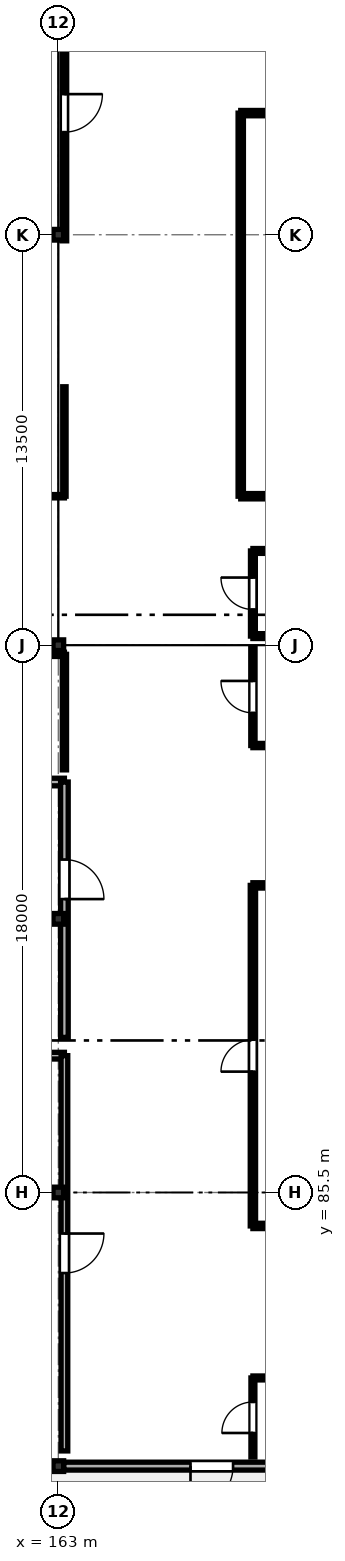
"""IFC4 building model, lengths in metres.
Left out: names, types, materials, properties, quantities, classifications, styles, units other than length and angle.
Written with IfcOpenShell. Run it as: python <this file> out.ifc"""

import sys

from ifc_helpers import new_model, si_unit, direction, frame, frame_2d, origin, origin_2d, place, context, subcontext, project, spatial, rectangle, i_section, extrude, element, fill, save


model = new_model("IFC4")
c1 = context("Model", 3, precision=1e-05, world=origin(), true_north=direction((0.0, 1.0)))
c2 = subcontext(c1, "Body", "Model", "MODEL_VIEW")
j1 = project(units=[si_unit("LENGTHUNIT", "METRE"), si_unit("PLANEANGLEUNIT", "RADIAN")], contexts=[c1])
p1 = place(None, origin())
s1 = spatial("IfcSite", under=j1, at=p1, CompositionType="ELEMENT")
p2 = place(p1, origin())
s2 = spatial("IfcBuilding", under=s1, at=p2, CompositionType="ELEMENT")
p3 = place(p2, frame((0.0, 0.0, 17.6)))
s3 = spatial("IfcBuildingStorey", under=s2, at=p3, CompositionType="ELEMENT", Elevation=17.6)
for number, where, z_axis, x_axis in (
    (1, (163.0, 76.5, 0.0), (0.0, 0.0, 1.0), (1.0, 0.0, 0.0)),
    (2, (163.0, 85.5, 0.0), (0.0, 0.0, 1.0), (1.0, 0.0, 0.0)),
    (3, (163.0, 94.5, 0.0), (0.0, 0.0, 1.0), (1.0, 0.0, 0.0)),
    (4, (163.0, 103.5, 0.0), (0.0, 0.0, 1.0), (1.0, 0.0, 0.0)),
    (5, (163.0, 117.0, 0.0), (0.0, 0.0, 1.0), (1.0, 0.0, 0.0)),
):
    element("IfcColumn", number, at=place(p3, frame(where, z_axis=z_axis, x_axis=x_axis)), inside=s3, PredefinedType="COLUMN", context=c2, shape_type="SweptSolid", body=[
        extrude(i_section(OverallWidth=0.35, OverallDepth=0.35, WebThickness=0.012, FlangeThickness=0.019, FilletRadius=0.02, at=origin_2d()), origin(), (0.0, 0.0, 1.0), 3.2),
    ])
p4 = place(p3, frame((171.825, 76.5, 0.0), z_axis=(0.0, 0.0, 1.0), x_axis=(-1.0, 0.0, 0.0)))
e6 = element("IfcWall", 6, at=p4, inside=s3, PredefinedType="SOLIDWALL", context=c2, shape_type="SweptSolid", body=[
    extrude(rectangle(XDim=8.65, YDim=0.26, at=frame_2d((4.325, 0.0))), origin(), (0.0, 0.0, 1.0), 2.505),
])
p5 = place(p4, frame((3.078, 0.0, 0.0)))
e7 = element("IfcOpeningElement", 7, at=p5, cuts=e6, PredefinedType="OPENING", context=c2, shape_type="SweptSolid", body=[
    extrude(rectangle(XDim=1.4, YDim=2.25, at=frame_2d((0.7, 1.125))), frame((0.0, 0.14, 0.0), z_axis=(0.0, -1.0, 0.0), x_axis=(1.0, 0.0, 0.0)), (0.0, 0.0, 1.0), 0.28),
])
p6 = place(p3, frame((162.825, 76.5, 0.0), z_axis=(0.0, 0.0, 1.0), x_axis=(-1.0, 0.0, 0.0)))
e8 = element("IfcWall", 8, at=p6, inside=s3, PredefinedType="SOLIDWALL", context=c2, shape_type="SweptSolid", body=[
    extrude(rectangle(XDim=8.65, YDim=0.26, at=frame_2d((4.325, 0.0))), origin(), (0.0, 0.0, 1.0), 2.505),
])
p7 = place(p6, frame((3.625, 0.0, 0.75)))
e9 = element("IfcOpeningElement", 9, at=p7, cuts=e8, PredefinedType="OPENING", context=c2, shape_type="SweptSolid", body=[
    extrude(rectangle(XDim=1.4, YDim=1.55, at=frame_2d((0.7, 0.775))), frame((0.0, 0.14, 0.0), z_axis=(0.0, -1.0, 0.0), x_axis=(1.0, 0.0, 0.0)), (0.0, 0.0, 1.0), 0.28),
])
p8 = place(p3, frame((154.6, 90.0, 0.0), z_axis=(0.0, 0.0, 1.0), x_axis=(1.0, 0.0, 0.0)))
e10 = element("IfcWall", 10, at=p8, inside=s3, PredefinedType="SOLIDWALL", context=c2, shape_type="SweptSolid", body=[
    extrude(rectangle(XDim=8.6, YDim=0.22, at=frame_2d((4.3, 0.0))), origin(), (0.0, 0.0, 1.0), 2.555),
])
p9 = place(p3, frame((163.2, 90.0, 0.0), z_axis=(0.0, 0.0, 1.0), x_axis=(0.0, -1.0, 0.0)))
e11 = element("IfcWall", 11, at=p9, inside=s3, PredefinedType="SOLIDWALL", context=c2, shape_type="SweptSolid", body=[
    extrude(rectangle(XDim=13.0, YDim=0.22, at=frame_2d((6.5, 0.0))), origin(), (0.0, 0.0, 1.0), 2.505),
])
p10 = place(p9, frame((5.85, 0.0, 0.0)))
e12 = element("IfcOpeningElement", 12, at=p10, cuts=e11, PredefinedType="OPENING", context=c2, shape_type="SweptSolid", body=[
    extrude(rectangle(XDim=1.3, YDim=2.1, at=frame_2d((0.65, 1.05))), frame((0.0, 0.12, 0.0), z_axis=(0.0, -1.0, 0.0), x_axis=(1.0, 0.0, 0.0)), (0.0, 0.0, 1.0), 0.24),
])
p11 = place(p3, frame((154.6, 99.0, 0.0), z_axis=(0.0, 0.0, 1.0), x_axis=(1.0, 0.0, 0.0)))
e13 = element("IfcWall", 13, at=p11, inside=s3, PredefinedType="SOLIDWALL", context=c2, shape_type="SweptSolid", body=[
    extrude(rectangle(XDim=8.6, YDim=0.25, at=frame_2d((4.3, 0.0))), origin(), (0.0, 0.0, 1.0), 2.555),
])
p12 = place(p3, frame((163.2, 99.0, 0.0), z_axis=(0.0, 0.0, 1.0), x_axis=(0.0, -1.0, 0.0)))
e14 = element("IfcWall", 14, at=p12, inside=s3, PredefinedType="SOLIDWALL", context=c2, shape_type="SweptSolid", body=[
    extrude(rectangle(XDim=8.4, YDim=0.25, at=frame_2d((4.2, 0.0))), origin(), (0.0, 0.0, 1.0), 2.505),
])
p13 = place(p12, frame((2.55, 0.0, 0.0)))
e15 = element("IfcOpeningElement", 15, at=p13, cuts=e14, PredefinedType="OPENING", context=c2, shape_type="SweptSolid", body=[
    extrude(rectangle(XDim=1.3, YDim=2.1, at=frame_2d((0.65, 1.05))), frame((0.0, 0.135, 0.0), z_axis=(0.0, -1.0, 0.0), x_axis=(1.0, 0.0, 0.0)), (0.0, 0.0, 1.0), 0.27),
])
p14 = place(p3, frame((163.2, 125.2, 0.0), z_axis=(0.0, 0.0, 1.0), x_axis=(0.0, -1.0, 0.0)))
e16 = element("IfcWall", 16, at=p14, inside=s3, PredefinedType="PARTITIONING", context=c2, shape_type="SweptSolid", body=[
    extrude(rectangle(XDim=8.4, YDim=0.15, at=frame_2d((4.2, 0.0))), origin(), (0.0, 0.0, 1.0), 2.355),
])
p15 = place(p14, frame((3.575, 0.0, 0.0)))
e17 = element("IfcOpeningElement", 17, at=p15, cuts=e16, PredefinedType="OPENING", context=c2, shape_type="SweptSolid", body=[
    extrude(rectangle(XDim=1.25, YDim=2.1, at=frame_2d((0.625, 1.05))), frame((0.0, 0.085, 0.0), z_axis=(0.0, -1.0, 0.0), x_axis=(1.0, 0.0, 0.0)), (0.0, 0.0, 1.0), 0.17),
])
p16 = place(p3, frame((180.8, 100.2, 0.0), z_axis=(0.0, 0.0, 1.0), x_axis=(-1.0, 0.0, 0.0)))
e18 = element("IfcWall", 18, at=p16, inside=s3, PredefinedType="PARTITIONING", context=c2, shape_type="SweptSolid", body=[
    extrude(rectangle(XDim=11.4, YDim=0.14, at=frame_2d((5.7, 0.0))), origin(), (0.0, 0.0, 1.0), 2.565),
])
p17 = place(p3, frame((169.4, 100.2, 0.0), z_axis=(0.0, 0.0, 1.0), x_axis=(0.0, 1.0, 0.0)))
e19 = element("IfcWall", 19, at=p17, inside=s3, PredefinedType="PARTITIONING", context=c2, shape_type="SweptSolid", body=[
    extrude(rectangle(XDim=3.2, YDim=0.14, at=frame_2d((1.6, 0.0))), origin(), (0.0, 0.0, 1.0), 2.515),
])
p18 = place(p17, frame((1.075, 0.0, 0.0)))
e20 = element("IfcOpeningElement", 20, at=p18, cuts=e19, PredefinedType="OPENING", context=c2, shape_type="SweptSolid", body=[
    extrude(rectangle(XDim=1.05, YDim=2.1, at=frame_2d((0.525, 1.05))), frame((0.0, 0.08, 0.0), z_axis=(0.0, -1.0, 0.0), x_axis=(1.0, 0.0, 0.0)), (0.0, 0.0, 1.0), 0.16),
])
p19 = place(p3, frame((163.2, 108.4, 0.0), z_axis=(0.0, 0.0, 1.0), x_axis=(-1.0, 0.0, 0.0)))
e21 = element("IfcWall", 21, at=p19, inside=s3, PredefinedType="PARTITIONING", context=c2, shape_type="SweptSolid", body=[
    extrude(rectangle(XDim=16.6, YDim=0.11, at=frame_2d((8.3, 0.0))), origin(), (0.0, 0.0, 1.0), 2.355),
])
p20 = place(p19, frame((7.725, 0.0, 0.0)))
e22 = element("IfcOpeningElement", 22, at=p20, cuts=e21, PredefinedType="OPENING", context=c2, shape_type="SweptSolid", body=[
    extrude(rectangle(XDim=1.15, YDim=2.1, at=frame_2d((0.575, 1.05))), frame((0.0, 0.065, 0.0), z_axis=(0.0, -1.0, 0.0), x_axis=(1.0, 0.0, 0.0)), (0.0, 0.0, 1.0), 0.13),
])
p21 = place(p3, frame((163.2, 112.0, 0.0), z_axis=(0.0, 0.0, 1.0), x_axis=(0.0, -1.0, 0.0)))
e23 = element("IfcWall", 23, at=p21, inside=s3, PredefinedType="PARTITIONING", context=c2, shape_type="SweptSolid", body=[
    extrude(rectangle(XDim=3.6, YDim=0.11, at=frame_2d((1.8, 0.0))), origin(), (0.0, 0.0, 1.0), 2.355),
])
for number, where, z_axis, x_axis in (
    (24, (173.4, 84.4, 0.0), (0.0, 0.0, 1.0), (-1.0, 0.0, 0.0)),
    (25, (169.4, 95.6, 0.0), (0.0, 0.0, 1.0), (1.0, 0.0, 0.0)),
):
    element("IfcWall", number, at=place(p3, frame(where, z_axis=z_axis, x_axis=x_axis)), inside=s3, PredefinedType="PARTITIONING", context=c2, shape_type="SweptSolid", body=[
        extrude(rectangle(XDim=4.0, YDim=0.175, at=frame_2d((2.0, 0.0))), origin(), (0.0, 0.0, 1.0), 2.565),
    ])
p22 = place(p3, frame((169.4, 84.4, 0.0), z_axis=(0.0, 0.0, 1.0), x_axis=(0.0, 1.0, 0.0)))
e26 = element("IfcWall", 26, at=p22, inside=s3, PredefinedType="PARTITIONING", context=c2, shape_type="SweptSolid", body=[
    extrude(rectangle(XDim=11.2, YDim=0.175, at=frame_2d((5.6, 0.0))), origin(), (0.0, 0.0, 1.0), 2.515),
])
p23 = place(p22, frame((5.075, 0.0, 0.0)))
e27 = element("IfcOpeningElement", 27, at=p23, cuts=e26, PredefinedType="OPENING", context=c2, shape_type="SweptSolid", body=[
    extrude(rectangle(XDim=1.05, YDim=2.1, at=frame_2d((0.525, 1.05))), frame((0.0, 0.097, 0.0), z_axis=(0.0, -1.0, 0.0), x_axis=(1.0, 0.0, 0.0)), (0.0, 0.0, 1.0), 0.195),
])
for number, where, z_axis, x_axis in (
    (28, (173.4, 103.8, 0.0), (0.0, 0.0, 1.0), (-1.0, 0.0, 0.0)),
    (29, (169.4, 106.6, 0.0), (0.0, 0.0, 1.0), (1.0, 0.0, 0.0)),
):
    element("IfcWall", number, at=place(p3, frame(where, z_axis=z_axis, x_axis=x_axis)), inside=s3, PredefinedType="PARTITIONING", context=c2, shape_type="SweptSolid", body=[
        extrude(rectangle(XDim=4.0, YDim=0.16, at=frame_2d((2.0, 0.0))), origin(), (0.0, 0.0, 1.0), 2.355),
    ])
p24 = place(p3, frame((169.4, 103.8, 0.0), z_axis=(0.0, 0.0, 1.0), x_axis=(0.0, 1.0, 0.0)))
e30 = element("IfcWall", 30, at=p24, inside=s3, PredefinedType="PARTITIONING", context=c2, shape_type="SweptSolid", body=[
    extrude(rectangle(XDim=2.8, YDim=0.16, at=frame_2d((1.4, 0.0))), origin(), (0.0, 0.0, 1.0), 2.515),
])
p25 = place(p24, frame((0.875, 0.0, 0.0)))
e31 = element("IfcOpeningElement", 31, at=p25, cuts=e30, PredefinedType="OPENING", context=c2, shape_type="SweptSolid", body=[
    extrude(rectangle(XDim=1.05, YDim=2.1, at=frame_2d((0.525, 1.05))), frame((0.0, 0.09, 0.0), z_axis=(0.0, -1.0, 0.0), x_axis=(1.0, 0.0, 0.0)), (0.0, 0.0, 1.0), 0.18),
])
p26 = place(p3, frame((159.2, 103.2, 0.0), z_axis=(0.0, 0.0, 1.0), x_axis=(1.0, 0.0, 0.0)))
e32 = element("IfcWall", 32, at=p26, inside=s3, PredefinedType="PARTITIONING", context=c2, shape_type="SweptSolid", body=[
    extrude(rectangle(XDim=4.0, YDim=0.14, at=frame_2d((2.0, 0.0))), origin(), (0.0, 0.0, 1.0), 2.355),
])
p27 = place(p26, frame((1.55, 0.0, 0.0)))
e33 = element("IfcOpeningElement", 33, at=p27, cuts=e32, PredefinedType="OPENING", context=c2, shape_type="SweptSolid", body=[
    extrude(rectangle(XDim=0.9, YDim=2.1, at=frame_2d((0.45, 1.05))), frame((0.0, 0.08, 0.0), z_axis=(0.0, -1.0, 0.0), x_axis=(1.0, 0.0, 0.0)), (0.0, 0.0, 1.0), 0.16),
])
p28 = place(p3, frame((163.2, 103.2, 0.0), z_axis=(0.0, 0.0, 1.0), x_axis=(0.0, -1.0, 0.0)))
e34 = element("IfcWall", 34, at=p28, inside=s3, PredefinedType="PARTITIONING", context=c2, shape_type="SweptSolid", body=[
    extrude(rectangle(XDim=3.8, YDim=0.14, at=frame_2d((1.9, 0.0))), origin(), (0.0, 0.0, 1.0), 2.355),
])
p29 = place(p3, frame((169.4, 79.4, 0.0), z_axis=(0.0, 0.0, 1.0), x_axis=(1.0, 0.0, 0.0)))
e35 = element("IfcWall", 35, at=p29, inside=s3, PredefinedType="PARTITIONING", context=c2, shape_type="SweptSolid", body=[
    extrude(rectangle(XDim=4.0, YDim=0.13, at=frame_2d((2.0, 0.0))), origin(), (0.0, 0.0, 1.0), 2.565),
])
p30 = place(p3, frame((169.4, 76.8, 0.0), z_axis=(0.0, 0.0, 1.0), x_axis=(0.0, 1.0, 0.0)))
e36 = element("IfcWall", 36, at=p30, inside=s3, PredefinedType="PARTITIONING", context=c2, shape_type="SweptSolid", body=[
    extrude(rectangle(XDim=2.6, YDim=0.13, at=frame_2d((1.3, 0.0))), origin(), (0.0, 0.0, 1.0), 2.515),
])
p31 = place(p30, frame((0.79, 0.0, 0.0)))
e37 = element("IfcOpeningElement", 37, at=p31, cuts=e36, PredefinedType="OPENING", context=c2, shape_type="SweptSolid", body=[
    extrude(rectangle(XDim=1.02, YDim=2.05, at=frame_2d((0.51, 1.025))), frame((0.0, 0.075, 0.0), z_axis=(0.0, -1.0, 0.0), x_axis=(1.0, 0.0, 0.0)), (0.0, 0.0, 1.0), 0.15),
])
p32 = place(p3, frame((173.4, 108.4, 0.0), z_axis=(0.0, 0.0, 1.0), x_axis=(-1.0, 0.0, 0.0)))
e38 = element("IfcWall", 38, at=p32, inside=s3, PredefinedType="PARTITIONING", context=c2, shape_type="SweptSolid", body=[
    extrude(rectangle(XDim=4.4, YDim=0.175, at=frame_2d((2.2, 0.0))), origin(), (0.0, 0.0, 1.0), 2.355),
])
p33 = place(p3, frame((169.0, 121.0, 0.0), z_axis=(0.0, 0.0, 1.0), x_axis=(1.0, 0.0, 0.0)))
e39 = element("IfcWall", 39, at=p33, inside=s3, PredefinedType="PARTITIONING", context=c2, shape_type="SweptSolid", body=[
    extrude(rectangle(XDim=4.4, YDim=0.175, at=frame_2d((2.2, 0.0))), origin(), (0.0, 0.0, 1.0), 2.565),
])
p34 = place(p33, frame((1.625, 0.0, 0.0)))
e40 = element("IfcOpeningElement", 40, at=p34, cuts=e39, PredefinedType="OPENING", context=c2, shape_type="SweptSolid", body=[
    extrude(rectangle(XDim=1.15, YDim=2.1, at=frame_2d((0.575, 1.05))), frame((0.0, 0.097, 0.0), z_axis=(0.0, -1.0, 0.0), x_axis=(1.0, 0.0, 0.0)), (0.0, 0.0, 1.0), 0.195),
])
p35 = place(p3, frame((169.0, 108.4, 0.0), z_axis=(0.0, 0.0, 1.0), x_axis=(0.0, 1.0, 0.0)))
e41 = element("IfcWall", 41, at=p35, inside=s3, PredefinedType="PARTITIONING", context=c2, shape_type="SweptSolid", body=[
    extrude(rectangle(XDim=12.6, YDim=0.175, at=frame_2d((6.3, 0.0))), origin(), (0.0, 0.0, 1.0), 2.515),
])
p36 = place(p5, origin())
e42 = element("IfcDoor", 42, at=p36, inside=s3, OperationType="SINGLE_SWING_RIGHT", PredefinedType="DOOR", context=c2, shape_type="SweptSolid", body=[
    extrude(rectangle(XDim=1.4, YDim=2.25, at=frame_2d((0.7, 1.125))), frame((0.0, 0.025, 0.0), z_axis=(0.0, -1.0, 0.0), x_axis=(1.0, 0.0, 0.0)), (0.0, 0.0, 1.0), 0.05),
])
fill(e7, e42)
p37 = place(p10, origin())
e43 = element("IfcDoor", 43, at=p37, inside=s3, OperationType="SINGLE_SWING_LEFT", PredefinedType="DOOR", context=c2, shape_type="SweptSolid", body=[
    extrude(rectangle(XDim=1.3, YDim=2.1, at=frame_2d((0.65, 1.05))), frame((0.0, 0.025, 0.0), z_axis=(0.0, -1.0, 0.0), x_axis=(1.0, 0.0, 0.0)), (0.0, 0.0, 1.0), 0.05),
])
fill(e12, e43)
p38 = place(p13, origin())
e44 = element("IfcDoor", 44, at=p38, inside=s3, OperationType="SINGLE_SWING_RIGHT", PredefinedType="DOOR", context=c2, shape_type="SweptSolid", body=[
    extrude(rectangle(XDim=1.3, YDim=2.1, at=frame_2d((0.65, 1.05))), frame((0.0, 0.025, 0.0), z_axis=(0.0, -1.0, 0.0), x_axis=(1.0, 0.0, 0.0)), (0.0, 0.0, 1.0), 0.05),
])
fill(e15, e44)
p39 = place(p15, origin())
e45 = element("IfcDoor", 45, at=p39, inside=s3, OperationType="SINGLE_SWING_LEFT", PredefinedType="DOOR", context=c2, shape_type="SweptSolid", body=[
    extrude(rectangle(XDim=1.25, YDim=2.1, at=frame_2d((0.625, 1.05))), frame((0.0, 0.025, 0.0), z_axis=(0.0, -1.0, 0.0), x_axis=(1.0, 0.0, 0.0)), (0.0, 0.0, 1.0), 0.05),
])
fill(e17, e45)
p40 = place(p18, origin())
e46 = element("IfcDoor", 46, at=p40, inside=s3, OperationType="SINGLE_SWING_RIGHT", PredefinedType="DOOR", context=c2, shape_type="SweptSolid", body=[
    extrude(rectangle(XDim=1.05, YDim=2.1, at=frame_2d((0.525, 1.05))), frame((0.0, 0.025, 0.0), z_axis=(0.0, -1.0, 0.0), x_axis=(1.0, 0.0, 0.0)), (0.0, 0.0, 1.0), 0.05),
])
fill(e20, e46)
p41 = place(p23, origin())
e47 = element("IfcDoor", 47, at=p41, inside=s3, OperationType="SINGLE_SWING_LEFT", PredefinedType="DOOR", context=c2, shape_type="SweptSolid", body=[
    extrude(rectangle(XDim=1.05, YDim=2.1, at=frame_2d((0.525, 1.05))), frame((0.0, 0.025, 0.0), z_axis=(0.0, -1.0, 0.0), x_axis=(1.0, 0.0, 0.0)), (0.0, 0.0, 1.0), 0.05),
])
fill(e27, e47)
p42 = place(p25, origin())
e48 = element("IfcDoor", 48, at=p42, inside=s3, OperationType="SINGLE_SWING_RIGHT", PredefinedType="DOOR", context=c2, shape_type="SweptSolid", body=[
    extrude(rectangle(XDim=1.05, YDim=2.1, at=frame_2d((0.525, 1.05))), frame((0.0, 0.025, 0.0), z_axis=(0.0, -1.0, 0.0), x_axis=(1.0, 0.0, 0.0)), (0.0, 0.0, 1.0), 0.05),
])
fill(e31, e48)
p43 = place(p31, origin())
e49 = element("IfcDoor", 49, at=p43, inside=s3, OperationType="SINGLE_SWING_LEFT", PredefinedType="DOOR", context=c2, shape_type="SweptSolid", body=[
    extrude(rectangle(XDim=1.02, YDim=2.05, at=frame_2d((0.51, 1.025))), frame((0.0, 0.025, 0.0), z_axis=(0.0, -1.0, 0.0), x_axis=(1.0, 0.0, 0.0)), (0.0, 0.0, 1.0), 0.05),
])
fill(e37, e49)
save(model, sys.argv[1])
